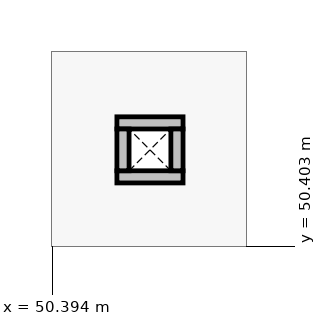
"""IFC4 building model, lengths in metres.
Left out: names, types, materials, properties, quantities, classifications, styles, units other than length and angle.
Written with IfcOpenShell. Run it as: python <this file> out.ifc"""

import sys

from ifc_helpers import new_model, si_unit, direction, frame, frame_2d, origin, place, context, subcontext, project, spatial, rectangle, extrude, element, save


model = new_model("IFC4")
c1 = context("Model", 3, precision=1e-05, world=origin(), true_north=direction((0.0, 1.0)))
c2 = subcontext(c1, "Body", "Model", "MODEL_VIEW")
j1 = project(units=[si_unit("LENGTHUNIT", "METRE"), si_unit("PLANEANGLEUNIT", "RADIAN")], contexts=[c1])
p1 = place(None, origin())
s1 = spatial("IfcSite", under=j1, at=p1, CompositionType="ELEMENT")
p2 = place(p1, origin())
s2 = spatial("IfcBuilding", under=s1, at=p2, CompositionType="ELEMENT")
p3 = place(p2, frame((0.0, 0.0, 4.8)))
s3 = spatial("IfcBuildingStorey", under=s2, at=p3, CompositionType="ELEMENT", Elevation=4.8)
for number, where, z_axis, x_axis in (
    (1, (51.24, 51.32, 0.0), (0.0, 0.0, 1.0), (1.0, 0.0, 0.0)),
    (2, (51.24, 52.03, 0.0), (0.0, 0.0, 1.0), (1.0, 0.0, 0.0)),
):
    element("IfcWall", number, at=place(p3, frame(where, z_axis=z_axis, x_axis=x_axis)), inside=s3, PredefinedType="PARTITIONING", context=c2, shape_type="SweptSolid", body=[
        extrude(rectangle(XDim=0.87, YDim=0.16, at=frame_2d((0.435, 0.0))), origin(), (0.0, 0.0, 1.0), 3.35),
    ])
for number, where, z_axis, x_axis in (
    (3, (51.32, 51.4, 0.0), (0.0, 0.0, 1.0), (0.0, 1.0, 0.0)),
    (4, (52.03, 51.4, 0.0), (0.0, 0.0, 1.0), (0.0, 1.0, 0.0)),
):
    element("IfcWall", number, at=place(p3, frame(where, z_axis=z_axis, x_axis=x_axis)), inside=s3, PredefinedType="PARTITIONING", context=c2, shape_type="SweptSolid", body=[
        extrude(rectangle(XDim=0.55, YDim=0.16, at=frame_2d((0.275, 0.0))), origin(), (0.0, 0.0, 1.0), 3.35),
    ])
save(model, sys.argv[1])
